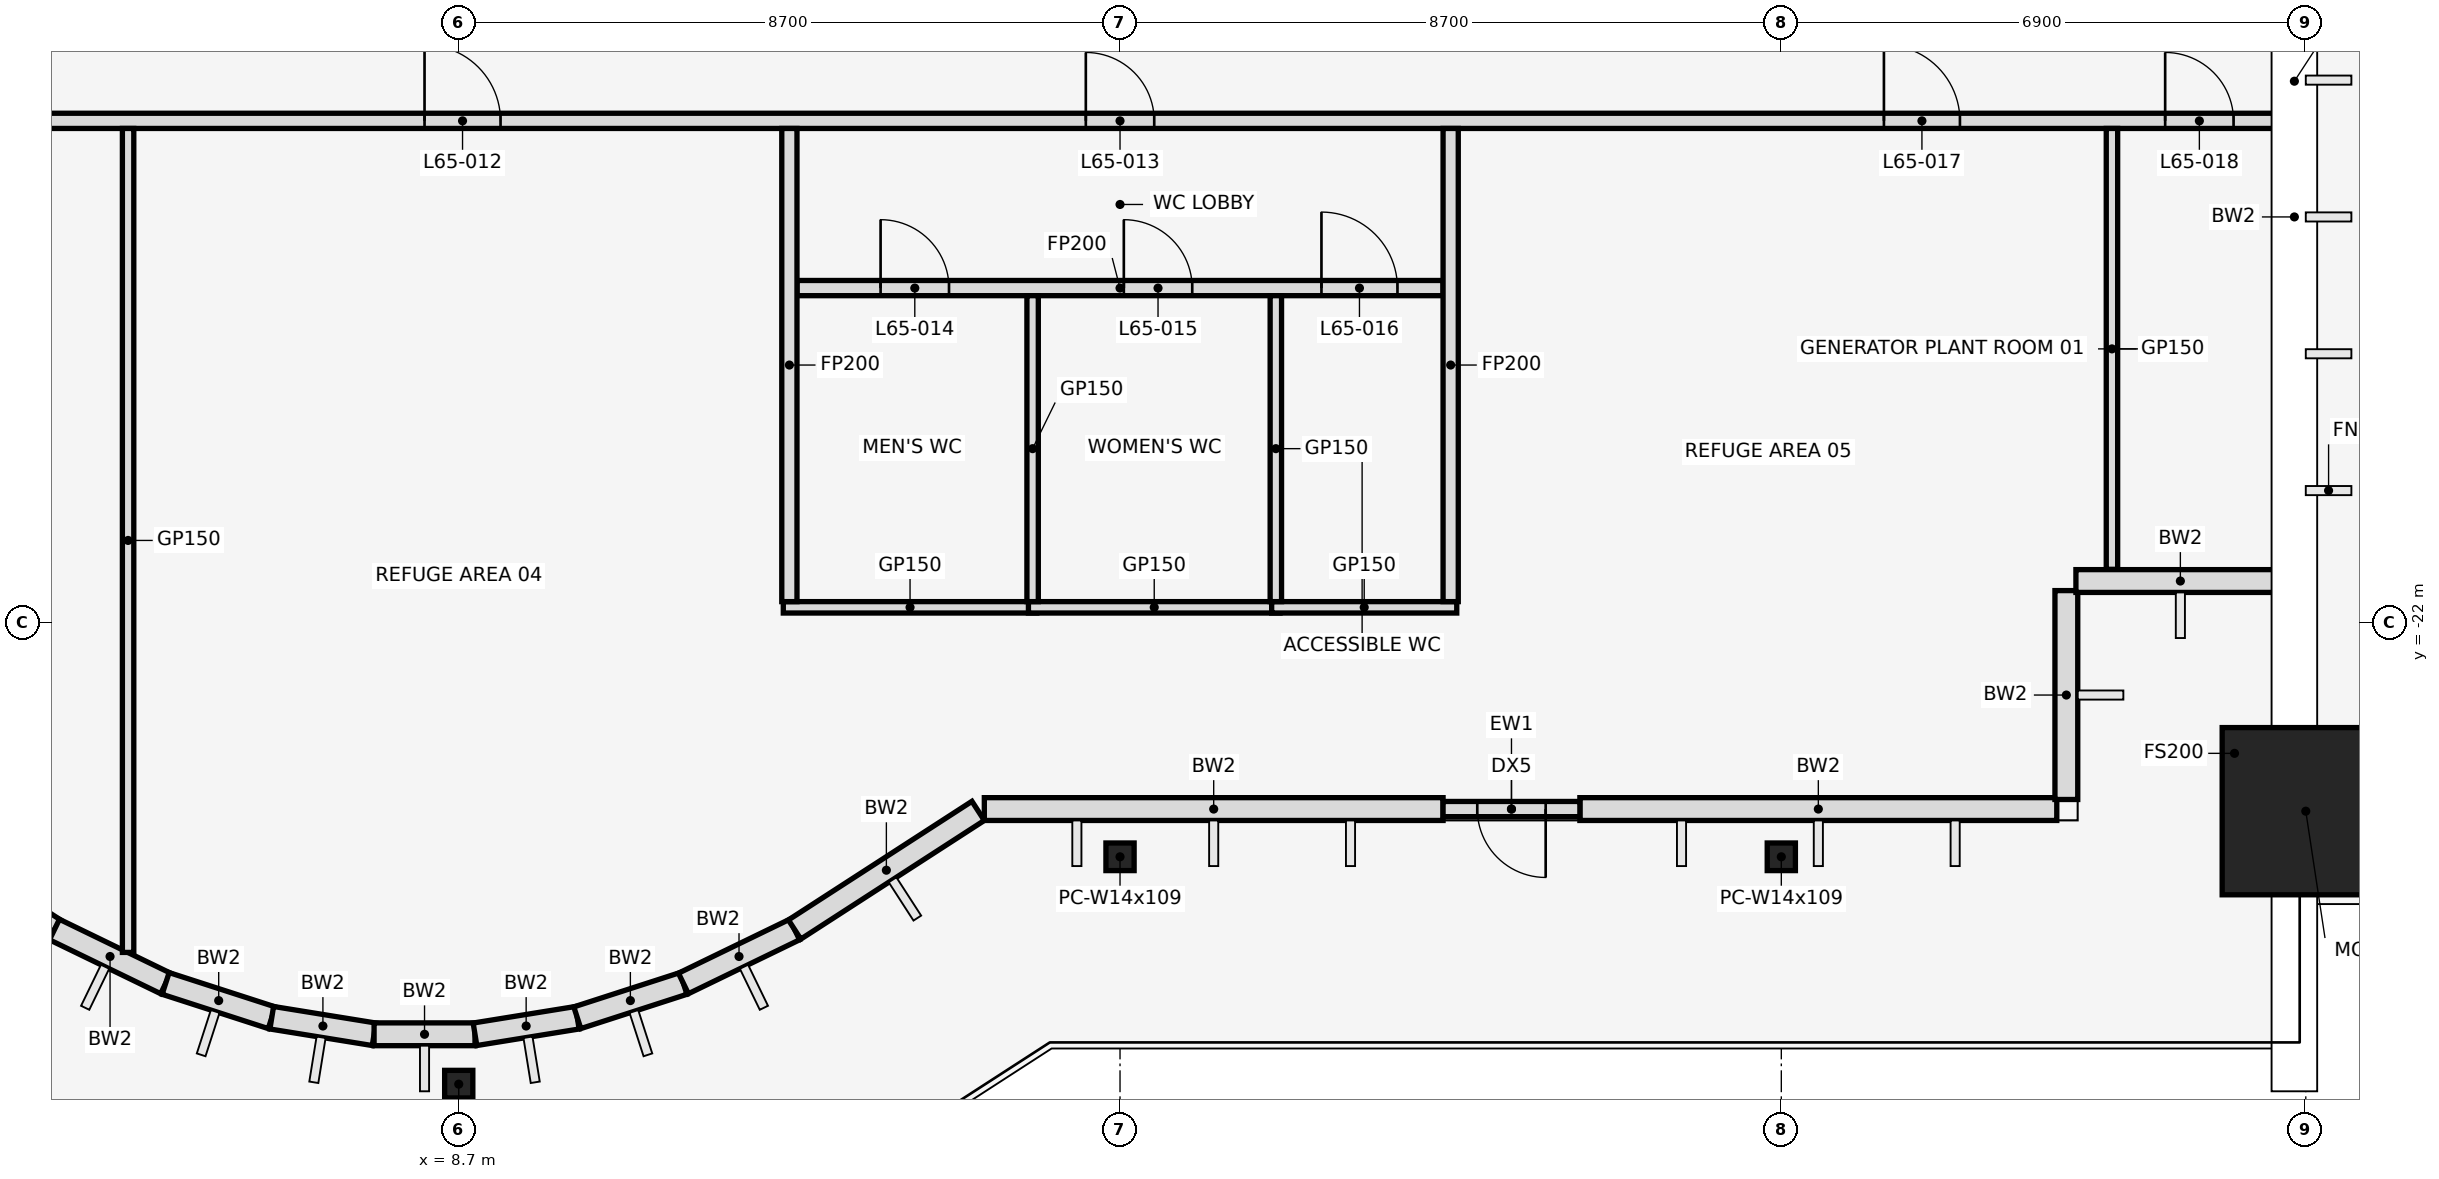
"""IFC4 building model, lengths in metres.
Left out: names, types, materials, properties, quantities, classifications, styles, units other than length and angle.
Written with IfcOpenShell. Run it as: python <this file> out.ifc"""

import sys

from ifc_helpers import new_model, si_unit, direction, frame, frame_2d, origin, origin_2d, place, context, subcontext, project, spatial, rectangle, hollow_rectangle, i_section, extrude, element, fill, save


model = new_model("IFC4")
c1 = context("Model", 3, precision=1e-05, world=origin(), true_north=direction((0.0, 1.0)))
c2 = subcontext(c1, "Body", "Model", "MODEL_VIEW")
j1 = project(units=[si_unit("LENGTHUNIT", "METRE"), si_unit("PLANEANGLEUNIT", "RADIAN")], contexts=[c1])
p1 = place(None, origin())
s1 = spatial("IfcSite", under=j1, at=p1, CompositionType="ELEMENT")
p2 = place(p1, origin())
s2 = spatial("IfcBuilding", under=s1, at=p2, CompositionType="ELEMENT")
p3 = place(p2, frame((0.0, 0.0, 287.6)))
s3 = spatial("IfcBuildingStorey", under=s2, at=p3, CompositionType="ELEMENT", Elevation=287.6)
for number, where, z_axis, x_axis in (
    (1, (8.7, -28.073, 0.0), (0.0, 0.0, 1.0), (1.0, 0.0, 0.0)),
    (2, (17.4, -25.082, 0.0), (0.0, 0.0, 1.0), (1.0, 0.0, 0.0)),
    (3, (26.1, -25.082, 0.0), (0.0, 0.0, 1.0), (1.0, 0.0, 0.0)),
):
    element("IfcColumn", number, at=place(p3, frame(where, z_axis=z_axis, x_axis=x_axis)), inside=s3, PredefinedType="COLUMN", context=c2, shape_type="SweptSolid", body=[
        extrude(i_section(OverallWidth=0.371, OverallDepth=0.363, WebThickness=0.013, FlangeThickness=0.022, at=origin_2d()), origin(), (0.0, 0.0, 1.0), 5.4),
    ])
p4 = place(p3, frame((33.0, -24.482, 0.0), z_axis=(0.0, 0.0, 1.0), x_axis=(1.0, 0.0, 0.0)))
e4 = element("IfcColumn", 4, at=p4, inside=s3, PredefinedType="COLUMN", context=c2, shape_type="SweptSolid", body=[
    extrude(hollow_rectangle(XDim=2.2, YDim=2.2, WallThickness=0.06, at=origin_2d()), origin(), (0.0, 0.0, 1.0), 5.4),
])
p5 = place(p3, frame((32.85, -21.328, 0.0), z_axis=(0.0, 0.0, 1.0), x_axis=(0.0, 1.0, 0.0)))
e5 = element("IfcWall", 5, at=p5, inside=s3, PredefinedType="STANDARD", context=c2, shape_type="SweptSolid", body=[
    extrude(rectangle(XDim=9.328, YDim=0.3, at=frame_2d((4.664, 0.0))), origin(), (0.0, 0.0, 1.0), 4.338),
])
p6 = place(p3, frame((0.081, -23.906, 0.0), z_axis=(0.0, 0.0, 1.0), x_axis=(0.839805110115, -0.542887996759, 0.0)))
e6 = element("IfcWall", 6, at=p6, inside=s3, PredefinedType="STANDARD", context=c2, shape_type="SweptSolid", body=[
    extrude(rectangle(XDim=3.929, YDim=0.3, at=frame_2d((1.965, 0.0))), origin(), (0.0, 0.0, 1.0), 4.65),
])
p7 = place(p3, frame((3.381, -26.039, 0.0), z_axis=(0.0, 0.0, 1.0), x_axis=(0.899798026589, -0.436306671214, 0.0)))
e7 = element("IfcWall", 7, at=p7, inside=s3, PredefinedType="STANDARD", context=c2, shape_type="SweptSolid", body=[
    extrude(rectangle(XDim=1.625, YDim=0.3, at=frame_2d((0.813, 0.0))), origin(), (0.0, 0.0, 1.0), 4.572),
])
p8 = place(p3, frame((4.844, -26.748, 0.0), z_axis=(0.0, 0.0, 1.0), x_axis=(0.951539081691, -0.307527845919, 0.0)))
e8 = element("IfcWall", 8, at=p8, inside=s3, PredefinedType="STANDARD", context=c2, shape_type="SweptSolid", body=[
    extrude(rectangle(XDim=1.467, YDim=0.3, at=frame_2d((0.733, 0.0))), origin(), (0.0, 0.0, 1.0), 5.25),
])
p9 = place(p3, frame((6.24, -27.199, 0.0), z_axis=(0.0, 0.0, 1.0), x_axis=(0.987194777017, -0.15951950423, 0.0)))
e9 = element("IfcWall", 9, at=p9, inside=s3, PredefinedType="STANDARD", context=c2, shape_type="SweptSolid", body=[
    extrude(rectangle(XDim=1.364, YDim=0.3, at=frame_2d((0.682, 0.0))), origin(), (0.0, 0.0, 1.0), 5.25),
])
p10 = place(p3, frame((7.586, -27.417, 0.0), z_axis=(0.0, 0.0, 1.0), x_axis=(1.0, 0.0, 0.0)))
e10 = element("IfcWall", 10, at=p10, inside=s3, PredefinedType="STANDARD", context=c2, shape_type="SweptSolid", body=[
    extrude(rectangle(XDim=1.328, YDim=0.3, at=frame_2d((0.664, 0.0))), origin(), (0.0, 0.0, 1.0), 4.496),
])
p11 = place(p3, frame((8.914, -27.417, 0.0), z_axis=(0.0, 0.0, 1.0), x_axis=(0.987194777017, 0.15951950423, 0.0)))
e11 = element("IfcWall", 11, at=p11, inside=s3, PredefinedType="STANDARD", context=c2, shape_type="SweptSolid", body=[
    extrude(rectangle(XDim=1.364, YDim=0.3, at=frame_2d((0.682, 0.0))), origin(), (0.0, 0.0, 1.0), 4.496),
])
p12 = place(p3, frame((10.26, -27.199, 0.0), z_axis=(0.0, 0.0, 1.0), x_axis=(0.951539081691, 0.307527845919, 0.0)))
e12 = element("IfcWall", 12, at=p12, inside=s3, PredefinedType="STANDARD", context=c2, shape_type="SweptSolid", body=[
    extrude(rectangle(XDim=1.467, YDim=0.3, at=frame_2d((0.733, 0.0))), origin(), (0.0, 0.0, 1.0), 5.25),
])
p13 = place(p3, frame((11.656, -26.748, 0.0), z_axis=(0.0, 0.0, 1.0), x_axis=(0.899798026589, 0.436306671214, 0.0)))
e13 = element("IfcWall", 13, at=p13, inside=s3, PredefinedType="STANDARD", context=c2, shape_type="SweptSolid", body=[
    extrude(rectangle(XDim=1.625, YDim=0.3, at=frame_2d((0.813, 0.0))), origin(), (0.0, 0.0, 1.0), 4.572),
])
p14 = place(p3, frame((13.119, -26.039, 0.0), z_axis=(0.0, 0.0, 1.0), x_axis=(0.839779682339, 0.542927329512, 0.0)))
e14 = element("IfcWall", 14, at=p14, inside=s3, PredefinedType="STANDARD", context=c2, shape_type="SweptSolid", body=[
    extrude(rectangle(XDim=2.875, YDim=0.3, at=frame_2d((1.438, 0.0))), origin(), (0.0, 0.0, 1.0), 4.572),
])
p15 = place(p3, frame((15.615, -24.454, 0.0), z_axis=(0.0, 0.0, 1.0), x_axis=(1.0, 0.0, 0.0)))
e15 = element("IfcWall", 15, at=p15, inside=s3, PredefinedType="STANDARD", context=c2, shape_type="SweptSolid", body=[
    extrude(rectangle(XDim=6.035, YDim=0.3, at=frame_2d((3.018, 0.0))), origin(), (0.0, 0.0, 1.0), 4.65),
])
p16 = place(p3, frame((23.45, -24.454, 0.0), z_axis=(0.0, 0.0, 1.0), x_axis=(1.0, 0.0, 0.0)))
e16 = element("IfcWall", 16, at=p16, inside=s3, PredefinedType="STANDARD", context=c2, shape_type="SweptSolid", body=[
    extrude(rectangle(XDim=6.274, YDim=0.3, at=frame_2d((3.137, 0.0))), origin(), (0.0, 0.0, 1.0), 4.65),
])
for number, where, z_axis, x_axis in (
    (17, (29.85, -24.328, 0.0), (0.0, 0.0, 1.0), (0.0, 1.0, 0.0)),
    (18, (29.976, -21.454, 0.0), (0.0, 0.0, 1.0), (1.0, 0.0, 0.0)),
):
    element("IfcWall", number, at=place(p3, frame(where, z_axis=z_axis, x_axis=x_axis)), inside=s3, PredefinedType="STANDARD", context=c2, shape_type="SweptSolid", body=[
        extrude(rectangle(XDim=2.748, YDim=0.3, at=frame_2d((1.374, 0.0))), origin(), (0.0, 0.0, 1.0), 4.65),
    ])
p17 = place(p3, frame((23.45, -24.454, 0.0), z_axis=(0.0, 0.0, 1.0), x_axis=(-1.0, 0.0, 0.0)))
e19 = element("IfcWall", 19, at=p17, inside=s3, PredefinedType="STANDARD", context=c2, shape_type="SweptSolid", body=[
    extrude(rectangle(XDim=1.8, YDim=0.2, at=frame_2d((0.9, 0.0))), origin(), (0.0, 0.0, 1.0), 5.25),
])
p18 = place(p17, frame((0.45, 0.0, 0.0)))
e20 = element("IfcOpeningElement", 20, at=p18, cuts=e19, PredefinedType="OPENING", context=c2, shape_type="SweptSolid", body=[
    extrude(rectangle(XDim=0.9, YDim=2.1, at=frame_2d((0.45, 1.05))), frame((0.0, 0.112, 0.0), z_axis=(0.0, -1.0, 0.0), x_axis=(1.0, 0.0, 0.0)), (0.0, 0.0, 1.0), 0.224),
])
p19 = place(p3, frame((12.97, -21.8, 0.0), z_axis=(0.0, 0.0, 1.0), x_axis=(1.0, 0.0, 0.0)))
e21 = element("IfcWall", 21, at=p19, inside=s3, PredefinedType="PARTITIONING", context=c2, shape_type="SweptSolid", body=[
    extrude(rectangle(XDim=3.335, YDim=0.15, at=frame_2d((1.667, 0.0))), origin(), (0.0, 0.0, 1.0), 4.318),
])
p20 = place(p3, frame((16.195, -21.8, 0.0), z_axis=(0.0, 0.0, 1.0), x_axis=(1.0, 0.0, 0.0)))
e22 = element("IfcWall", 22, at=p20, inside=s3, PredefinedType="PARTITIONING", context=c2, shape_type="SweptSolid", body=[
    extrude(rectangle(XDim=3.31, YDim=0.15, at=frame_2d((1.655, 0.0))), origin(), (0.0, 0.0, 1.0), 4.318),
])
p21 = place(p3, frame((19.395, -21.8, 0.0), z_axis=(0.0, 0.0, 1.0), x_axis=(1.0, 0.0, 0.0)))
e23 = element("IfcWall", 23, at=p21, inside=s3, PredefinedType="PARTITIONING", context=c2, shape_type="SweptSolid", body=[
    extrude(rectangle(XDim=2.435, YDim=0.15, at=frame_2d((1.218, 0.0))), origin(), (0.0, 0.0, 1.0), 4.318),
])
p22 = place(p3, frame((13.15, -17.6, 0.0), z_axis=(0.0, 0.0, 1.0), x_axis=(1.0, 0.0, 0.0)))
e24 = element("IfcWall", 24, at=p22, inside=s3, PredefinedType="PARTITIONING", context=c2, shape_type="SweptSolid", body=[
    extrude(rectangle(XDim=8.5, YDim=0.2, at=frame_2d((4.25, 0.0))), origin(), (0.0, 0.0, 1.0), 4.318),
])
p23 = place(p22, frame((1.1, 0.0, 0.0)))
e25 = element("IfcOpeningElement", 25, at=p23, cuts=e24, PredefinedType="OPENING", context=c2, shape_type="SweptSolid", body=[
    extrude(rectangle(XDim=0.9, YDim=2.1, at=frame_2d((0.45, 1.05))), frame((0.0, 0.112, 0.0), z_axis=(0.0, -1.0, 0.0), x_axis=(1.0, 0.0, 0.0)), (0.0, 0.0, 1.0), 0.224),
])
p24 = place(p22, frame((4.3, 0.0, 0.0)))
e26 = element("IfcOpeningElement", 26, at=p24, cuts=e24, PredefinedType="OPENING", context=c2, shape_type="SweptSolid", body=[
    extrude(rectangle(XDim=0.9, YDim=2.1, at=frame_2d((0.45, 1.05))), frame((0.0, 0.112, 0.0), z_axis=(0.0, -1.0, 0.0), x_axis=(1.0, 0.0, 0.0)), (0.0, 0.0, 1.0), 0.224),
])
p25 = place(p22, frame((6.9, 0.0, 0.0)))
e27 = element("IfcOpeningElement", 27, at=p25, cuts=e24, PredefinedType="OPENING", context=c2, shape_type="SweptSolid", body=[
    extrude(rectangle(XDim=1.0, YDim=2.1, at=frame_2d((0.5, 1.05))), frame((0.0, 0.112, 0.0), z_axis=(0.0, -1.0, 0.0), x_axis=(1.0, 0.0, 0.0)), (0.0, 0.0, 1.0), 0.224),
])
p26 = place(p3, frame((-32.7, -15.4, 0.0), z_axis=(0.0, 0.0, 1.0), x_axis=(1.0, 0.0, 0.0)))
e28 = element("IfcWall", 28, at=p26, inside=s3, PredefinedType="PARTITIONING", context=c2, shape_type="SweptSolid", body=[
    extrude(rectangle(XDim=65.4, YDim=0.2, at=frame_2d((32.7, 0.0))), origin(), (0.0, 0.0, 1.0), 4.318),
])
p27 = place(p26, frame((0.7, 0.0, 0.0)))
e29 = element("IfcOpeningElement", 29, at=p27, cuts=e28, PredefinedType="OPENING", context=c2, shape_type="SweptSolid", body=[
    extrude(rectangle(XDim=0.9, YDim=2.1, at=frame_2d((0.45, 1.05))), frame((0.0, 0.112, 0.0), z_axis=(0.0, -1.0, 0.0), x_axis=(1.0, 0.0, 0.0)), (0.0, 0.0, 1.0), 0.224),
])
p28 = place(p26, frame((4.25, 0.0, 0.0)))
e30 = element("IfcOpeningElement", 30, at=p28, cuts=e28, PredefinedType="OPENING", context=c2, shape_type="SweptSolid", body=[
    extrude(rectangle(XDim=1.0, YDim=2.1, at=frame_2d((0.5, 1.05))), frame((0.0, 0.112, 0.0), z_axis=(0.0, -1.0, 0.0), x_axis=(1.0, 0.0, 0.0)), (0.0, 0.0, 1.0), 0.224),
])
p29 = place(p26, frame((14.85, 0.0, 0.0)))
e31 = element("IfcOpeningElement", 31, at=p29, cuts=e28, PredefinedType="OPENING", context=c2, shape_type="SweptSolid", body=[
    extrude(rectangle(XDim=1.0, YDim=2.1, at=frame_2d((0.5, 1.05))), frame((0.0, 0.112, 0.0), z_axis=(0.0, -1.0, 0.0), x_axis=(1.0, 0.0, 0.0)), (0.0, 0.0, 1.0), 0.224),
])
p30 = place(p26, frame((23.55, 0.0, 0.0)))
e32 = element("IfcOpeningElement", 32, at=p30, cuts=e28, PredefinedType="OPENING", context=c2, shape_type="SweptSolid", body=[
    extrude(rectangle(XDim=1.0, YDim=2.1, at=frame_2d((0.5, 1.05))), frame((0.0, 0.112, 0.0), z_axis=(0.0, -1.0, 0.0), x_axis=(1.0, 0.0, 0.0)), (0.0, 0.0, 1.0), 0.224),
])
p31 = place(p26, frame((32.15, 0.0, 0.0)))
e33 = element("IfcOpeningElement", 33, at=p31, cuts=e28, PredefinedType="OPENING", context=c2, shape_type="SweptSolid", body=[
    extrude(rectangle(XDim=1.0, YDim=2.1, at=frame_2d((0.5, 1.05))), frame((0.0, 0.112, 0.0), z_axis=(0.0, -1.0, 0.0), x_axis=(1.0, 0.0, 0.0)), (0.0, 0.0, 1.0), 0.224),
])
p32 = place(p26, frame((40.95, 0.0, 0.0)))
e34 = element("IfcOpeningElement", 34, at=p32, cuts=e28, PredefinedType="OPENING", context=c2, shape_type="SweptSolid", body=[
    extrude(rectangle(XDim=1.0, YDim=2.1, at=frame_2d((0.5, 1.05))), frame((0.0, 0.112, 0.0), z_axis=(0.0, -1.0, 0.0), x_axis=(1.0, 0.0, 0.0)), (0.0, 0.0, 1.0), 0.224),
])
p33 = place(p26, frame((49.65, 0.0, 0.0)))
e35 = element("IfcOpeningElement", 35, at=p33, cuts=e28, PredefinedType="OPENING", context=c2, shape_type="SweptSolid", body=[
    extrude(rectangle(XDim=0.9, YDim=2.1, at=frame_2d((0.45, 1.05))), frame((0.0, 0.112, 0.0), z_axis=(0.0, -1.0, 0.0), x_axis=(1.0, 0.0, 0.0)), (0.0, 0.0, 1.0), 0.224),
])
p34 = place(p26, frame((60.15, 0.0, 0.0)))
e36 = element("IfcOpeningElement", 36, at=p34, cuts=e28, PredefinedType="OPENING", context=c2, shape_type="SweptSolid", body=[
    extrude(rectangle(XDim=1.0, YDim=2.1, at=frame_2d((0.5, 1.05))), frame((0.0, 0.112, 0.0), z_axis=(0.0, -1.0, 0.0), x_axis=(1.0, 0.0, 0.0)), (0.0, 0.0, 1.0), 0.224),
])
p35 = place(p26, frame((63.85, 0.0, 0.0)))
e37 = element("IfcOpeningElement", 37, at=p35, cuts=e28, PredefinedType="OPENING", context=c2, shape_type="SweptSolid", body=[
    extrude(rectangle(XDim=0.9, YDim=2.1, at=frame_2d((0.45, 1.05))), frame((0.0, 0.112, 0.0), z_axis=(0.0, -1.0, 0.0), x_axis=(1.0, 0.0, 0.0)), (0.0, 0.0, 1.0), 0.224),
])
p36 = place(p3, frame((4.35, -26.34, 0.0), z_axis=(0.0, 0.0, 1.0), x_axis=(0.0, 1.0, 0.0)))
e38 = element("IfcWall", 38, at=p36, inside=s3, PredefinedType="PARTITIONING", context=c2, shape_type="SweptSolid", body=[
    extrude(rectangle(XDim=10.84, YDim=0.15, at=frame_2d((5.42, 0.0))), origin(), (0.0, 0.0, 1.0), 4.318),
])
p37 = place(p3, frame((13.05, -21.725, 0.0), z_axis=(0.0, 0.0, 1.0), x_axis=(0.0, 1.0, 0.0)))
e39 = element("IfcWall", 39, at=p37, inside=s3, PredefinedType="PARTITIONING", context=c2, shape_type="SweptSolid", body=[
    extrude(rectangle(XDim=6.225, YDim=0.2, at=frame_2d((3.113, 0.0))), origin(), (0.0, 0.0, 1.0), 4.318),
])
for number, where, z_axis, x_axis in (
    (40, (16.25, -21.725, 0.0), (0.0, 0.0, 1.0), (0.0, 1.0, 0.0)),
    (41, (19.45, -21.725, 0.0), (0.0, 0.0, 1.0), (0.0, 1.0, 0.0)),
):
    element("IfcWall", number, at=place(p3, frame(where, z_axis=z_axis, x_axis=x_axis)), inside=s3, PredefinedType="PARTITIONING", context=c2, shape_type="SweptSolid", body=[
        extrude(rectangle(XDim=4.025, YDim=0.15, at=frame_2d((2.013, 0.0))), origin(), (0.0, 0.0, 1.0), 4.318),
    ])
p38 = place(p3, frame((21.75, -21.725, 0.0), z_axis=(0.0, 0.0, 1.0), x_axis=(0.0, 1.0, 0.0)))
e42 = element("IfcWall", 42, at=p38, inside=s3, PredefinedType="PARTITIONING", context=c2, shape_type="SweptSolid", body=[
    extrude(rectangle(XDim=6.225, YDim=0.2, at=frame_2d((3.113, 0.0))), origin(), (0.0, 0.0, 1.0), 4.318),
])
p39 = place(p3, frame((30.45, -21.3, 0.0), z_axis=(0.0, 0.0, 1.0), x_axis=(0.0, 1.0, 0.0)))
e43 = element("IfcWall", 43, at=p39, inside=s3, PredefinedType="PARTITIONING", context=c2, shape_type="SweptSolid", body=[
    extrude(rectangle(XDim=5.8, YDim=0.15, at=frame_2d((2.9, 0.0))), origin(), (0.0, 0.0, 1.0), 4.318),
])
p40 = place(p18, origin())
e44 = element("IfcDoor", 44, at=p40, inside=s3, OperationType="SINGLE_SWING_LEFT", PredefinedType="DOOR", context=c2, shape_type="SweptSolid", body=[
    extrude(rectangle(XDim=0.9, YDim=2.1, at=frame_2d((0.45, 1.05))), frame((0.0, 0.025, 0.0), z_axis=(0.0, -1.0, 0.0), x_axis=(1.0, 0.0, 0.0)), (0.0, 0.0, 1.0), 0.05),
])
fill(e20, e44)
p41 = place(p32, frame((1.0, 0.0, 0.0), z_axis=(0.0, 0.0, 1.0), x_axis=(-1.0, 0.0, 0.0)))
e45 = element("IfcDoor", 45, at=p41, inside=s3, OperationType="SINGLE_SWING_RIGHT", PredefinedType="DOOR", context=c2, shape_type="SweptSolid", body=[
    extrude(rectangle(XDim=1.0, YDim=2.1, at=frame_2d((0.5, 1.05))), frame((0.0, 0.025, 0.0), z_axis=(0.0, -1.0, 0.0), x_axis=(1.0, 0.0, 0.0)), (0.0, 0.0, 1.0), 0.05),
])
fill(e34, e45)
p42 = place(p33, frame((0.9, 0.0, 0.0), z_axis=(0.0, 0.0, 1.0), x_axis=(-1.0, 0.0, 0.0)))
e46 = element("IfcDoor", 46, at=p42, inside=s3, OperationType="SINGLE_SWING_LEFT", PredefinedType="DOOR", context=c2, shape_type="SweptSolid", body=[
    extrude(rectangle(XDim=0.9, YDim=2.1, at=frame_2d((0.45, 1.05))), frame((0.0, 0.025, 0.0), z_axis=(0.0, -1.0, 0.0), x_axis=(1.0, 0.0, 0.0)), (0.0, 0.0, 1.0), 0.05),
])
fill(e35, e46)
p43 = place(p23, frame((0.9, 0.0, 0.0), z_axis=(0.0, 0.0, 1.0), x_axis=(-1.0, 0.0, 0.0)))
e47 = element("IfcDoor", 47, at=p43, inside=s3, OperationType="SINGLE_SWING_RIGHT", PredefinedType="DOOR", context=c2, shape_type="SweptSolid", body=[
    extrude(rectangle(XDim=0.9, YDim=2.1, at=frame_2d((0.45, 1.05))), frame((0.0, 0.025, 0.0), z_axis=(0.0, -1.0, 0.0), x_axis=(1.0, 0.0, 0.0)), (0.0, 0.0, 1.0), 0.05),
])
fill(e25, e47)
p44 = place(p24, frame((0.9, 0.0, 0.0), z_axis=(0.0, 0.0, 1.0), x_axis=(-1.0, 0.0, 0.0)))
e48 = element("IfcDoor", 48, at=p44, inside=s3, OperationType="SINGLE_SWING_RIGHT", PredefinedType="DOOR", context=c2, shape_type="SweptSolid", body=[
    extrude(rectangle(XDim=0.9, YDim=2.1, at=frame_2d((0.45, 1.05))), frame((0.0, 0.025, 0.0), z_axis=(0.0, -1.0, 0.0), x_axis=(1.0, 0.0, 0.0)), (0.0, 0.0, 1.0), 0.05),
])
fill(e26, e48)
p45 = place(p25, frame((1.0, 0.0, 0.0), z_axis=(0.0, 0.0, 1.0), x_axis=(-1.0, 0.0, 0.0)))
e49 = element("IfcDoor", 49, at=p45, inside=s3, OperationType="SINGLE_SWING_LEFT", PredefinedType="DOOR", context=c2, shape_type="SweptSolid", body=[
    extrude(rectangle(XDim=1.0, YDim=2.1, at=frame_2d((0.5, 1.05))), frame((0.0, 0.025, 0.0), z_axis=(0.0, -1.0, 0.0), x_axis=(1.0, 0.0, 0.0)), (0.0, 0.0, 1.0), 0.05),
])
fill(e27, e49)
p46 = place(p34, frame((1.0, 0.0, 0.0), z_axis=(0.0, 0.0, 1.0), x_axis=(-1.0, 0.0, 0.0)))
e50 = element("IfcDoor", 50, at=p46, inside=s3, OperationType="SINGLE_SWING_RIGHT", PredefinedType="DOOR", context=c2, shape_type="SweptSolid", body=[
    extrude(rectangle(XDim=1.0, YDim=2.1, at=frame_2d((0.5, 1.05))), frame((0.0, 0.025, 0.0), z_axis=(0.0, -1.0, 0.0), x_axis=(1.0, 0.0, 0.0)), (0.0, 0.0, 1.0), 0.05),
])
fill(e36, e50)
p47 = place(p35, frame((0.9, 0.0, 0.0), z_axis=(0.0, 0.0, 1.0), x_axis=(-1.0, 0.0, 0.0)))
e51 = element("IfcDoor", 51, at=p47, inside=s3, OperationType="SINGLE_SWING_RIGHT", PredefinedType="DOOR", context=c2, shape_type="SweptSolid", body=[
    extrude(rectangle(XDim=0.9, YDim=2.1, at=frame_2d((0.45, 1.05))), frame((0.0, 0.025, 0.0), z_axis=(0.0, -1.0, 0.0), x_axis=(1.0, 0.0, 0.0)), (0.0, 0.0, 1.0), 0.05),
])
fill(e37, e51)
save(model, sys.argv[1])
